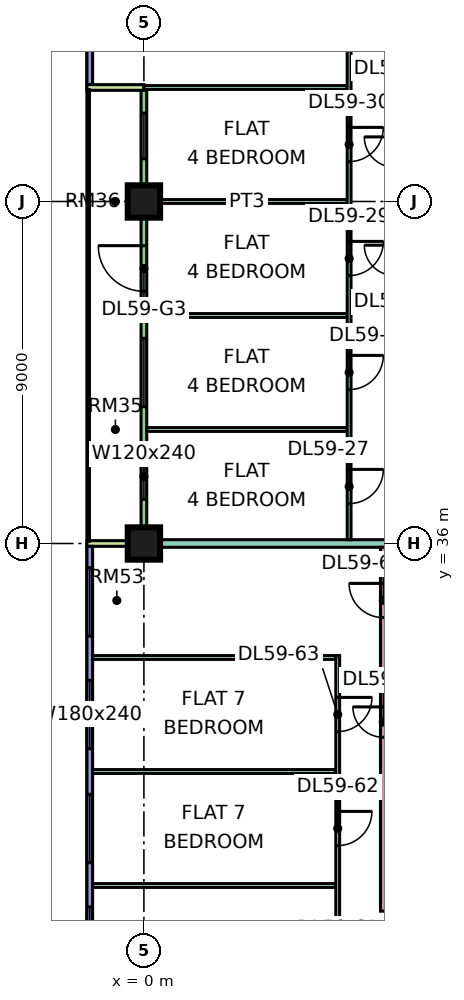
"""IFC4 building model, lengths in metres.
Left out: names, types, materials, properties, quantities, classifications, styles, units other than length and angle.
Written with IfcOpenShell. Run it as: python <this file> out.ifc"""

import sys

from ifc_helpers import new_model, si_unit, direction, frame, frame_2d, origin, origin_2d, place, context, subcontext, project, spatial, rectangle, extrude, element, fill, save


model = new_model("IFC4")
c1 = context("Model", 3, precision=1e-05, world=origin(), true_north=direction((0.0, 1.0)))
c2 = subcontext(c1, "Body", "Model", "MODEL_VIEW")
j1 = project(units=[si_unit("LENGTHUNIT", "METRE"), si_unit("PLANEANGLEUNIT", "RADIAN")], contexts=[c1])
p1 = place(None, origin())
s1 = spatial("IfcSite", under=j1, at=p1, CompositionType="ELEMENT")
p2 = place(p1, origin())
s2 = spatial("IfcBuilding", under=s1, at=p2, CompositionType="ELEMENT")
p3 = place(p2, frame((0.0, 0.0, 249.15)))
s3 = spatial("IfcBuildingStorey", under=s2, at=p3, CompositionType="ELEMENT", Elevation=249.15)
p4 = place(p3, frame((0.0, 36.0, 0.0), z_axis=(0.0, 0.0, 1.0), x_axis=(1.0, 0.0, 0.0)))
e1 = element("IfcColumn", 1, at=p4, inside=s3, PredefinedType="COLUMN", context=c2, shape_type="SweptSolid", body=[
    extrude(rectangle(XDim=0.85, YDim=0.85, at=origin_2d()), origin(), (0.0, 0.0, 1.0), 3.75),
])
p5 = place(p3, frame((0.0, 45.0, 0.0), z_axis=(0.0, 0.0, 1.0), x_axis=(1.0, 0.0, 0.0)))
e2 = element("IfcColumn", 2, at=p5, inside=s3, PredefinedType="COLUMN", context=c2, shape_type="SweptSolid", body=[
    extrude(rectangle(XDim=0.85, YDim=0.85, at=origin_2d()), origin(), (0.0, 0.0, 1.0), 3.75),
])
p6 = place(p3, frame((-1.425, 61.5, 0.0), z_axis=(0.0, 0.0, 1.0), x_axis=(0.0, -1.0, 0.0)))
e3 = element("IfcWall", 3, at=p6, inside=s3, PredefinedType="SOLIDWALL", context=c2, shape_type="SweptSolid", body=[
    extrude(rectangle(XDim=13.425, YDim=0.15, at=frame_2d((6.712, 0.0))), origin(), (0.0, 0.0, 1.0), 3.35),
])
p7 = place(p6, frame((0.3, 0.0, 0.45)))
e4 = element("IfcOpeningElement", 4, at=p7, cuts=e3, PredefinedType="OPENING", context=c2, shape_type="SweptSolid", body=[
    extrude(rectangle(XDim=0.9, YDim=2.4, at=frame_2d((0.45, 1.2))), frame((0.0, 0.085, 0.0), z_axis=(0.0, -1.0, 0.0), x_axis=(1.0, 0.0, 0.0)), (0.0, 0.0, 1.0), 0.17),
])
p8 = place(p6, frame((2.1, 0.0, 0.45)))
e5 = element("IfcOpeningElement", 5, at=p8, cuts=e3, PredefinedType="OPENING", context=c2, shape_type="SweptSolid", body=[
    extrude(rectangle(XDim=1.8, YDim=2.4, at=frame_2d((0.9, 1.2))), frame((0.0, 0.085, 0.0), z_axis=(0.0, -1.0, 0.0), x_axis=(1.0, 0.0, 0.0)), (0.0, 0.0, 1.0), 0.17),
])
p9 = place(p6, frame((7.462, 0.0, 0.45)))
e6 = element("IfcOpeningElement", 6, at=p9, cuts=e3, PredefinedType="OPENING", context=c2, shape_type="SweptSolid", body=[
    extrude(rectangle(XDim=3.0, YDim=2.4, at=frame_2d((1.5, 1.2))), frame((0.0, 0.085, 0.0), z_axis=(0.0, -1.0, 0.0), x_axis=(1.0, 0.0, 0.0)), (0.0, 0.0, 1.0), 0.17),
])
p10 = place(p3, frame((0.0, 47.925, 0.0), z_axis=(0.0, 0.0, 1.0), x_axis=(0.0, -1.0, 0.0)))
e7 = element("IfcWall", 7, at=p10, inside=s3, PredefinedType="SOLIDWALL", context=c2, shape_type="SweptSolid", body=[
    extrude(rectangle(XDim=11.85, YDim=0.15, at=frame_2d((5.925, 0.0))), origin(), (0.0, 0.0, 1.0), 3.35),
])
p11 = place(p10, frame((0.6, 0.0, 0.45)))
e8 = element("IfcOpeningElement", 8, at=p11, cuts=e7, PredefinedType="OPENING", context=c2, shape_type="SweptSolid", body=[
    extrude(rectangle(XDim=1.2, YDim=2.4, at=frame_2d((0.6, 1.2))), frame((0.0, 0.085, 0.0), z_axis=(0.0, -1.0, 0.0), x_axis=(1.0, 0.0, 0.0)), (0.0, 0.0, 1.0), 0.17),
])
p12 = place(p10, frame((4.087, 0.0, 0.0)))
e9 = element("IfcOpeningElement", 9, at=p12, cuts=e7, PredefinedType="OPENING", context=c2, shape_type="SweptSolid", body=[
    extrude(rectangle(XDim=1.2, YDim=2.4, at=frame_2d((0.6, 1.2))), frame((0.0, 0.085, 0.0), z_axis=(0.0, -1.0, 0.0), x_axis=(1.0, 0.0, 0.0)), (0.0, 0.0, 1.0), 0.17),
])
p13 = place(p10, frame((6.525, 0.0, 0.45)))
e10 = element("IfcOpeningElement", 10, at=p13, cuts=e7, PredefinedType="OPENING", context=c2, shape_type="SweptSolid", body=[
    extrude(rectangle(XDim=1.8, YDim=2.4, at=frame_2d((0.9, 1.2))), frame((0.0, 0.085, 0.0), z_axis=(0.0, -1.0, 0.0), x_axis=(1.0, 0.0, 0.0)), (0.0, 0.0, 1.0), 0.17),
])
p14 = place(p10, frame((9.562, 0.0, 0.45)))
e11 = element("IfcOpeningElement", 11, at=p14, cuts=e7, PredefinedType="OPENING", context=c2, shape_type="SweptSolid", body=[
    extrude(rectangle(XDim=1.2, YDim=2.4, at=frame_2d((0.6, 1.2))), frame((0.0, 0.085, 0.0), z_axis=(0.0, -1.0, 0.0), x_axis=(1.0, 0.0, 0.0)), (0.0, 0.0, 1.0), 0.17),
])
for number, where, z_axis, x_axis in (
    (12, (-1.5, 48.0, 0.0), (0.0, 0.0, 1.0), (1.0, 0.0, 0.0)),
    (13, (-1.5, 36.0, 0.0), (0.0, 0.0, 1.0), (1.0, 0.0, 0.0)),
):
    element("IfcWall", number, at=place(p3, frame(where, z_axis=z_axis, x_axis=x_axis)), inside=s3, PredefinedType="SOLIDWALL", context=c2, shape_type="SweptSolid", body=[
        extrude(rectangle(XDim=1.5, YDim=0.15, at=frame_2d((0.75, 0.0))), origin(), (0.0, 0.0, 1.0), 3.35),
    ])
p15 = place(p3, frame((-1.425, 35.925, 0.0), z_axis=(0.0, 0.0, 1.0), x_axis=(0.0, -1.0, 0.0)))
e14 = element("IfcWall", 14, at=p15, inside=s3, PredefinedType="SOLIDWALL", context=c2, shape_type="SweptSolid", body=[
    extrude(rectangle(XDim=11.85, YDim=0.15, at=frame_2d((5.925, 0.0))), origin(), (0.0, 0.0, 1.0), 3.35),
])
p16 = place(p15, frame((0.562, 0.0, 0.45)))
e15 = element("IfcOpeningElement", 15, at=p16, cuts=e14, PredefinedType="OPENING", context=c2, shape_type="SweptSolid", body=[
    extrude(rectangle(XDim=1.8, YDim=2.4, at=frame_2d((0.9, 1.2))), frame((0.0, 0.085, 0.0), z_axis=(0.0, -1.0, 0.0), x_axis=(1.0, 0.0, 0.0)), (0.0, 0.0, 1.0), 0.17),
])
p17 = place(p15, frame((3.525, 0.0, 0.45)))
e16 = element("IfcOpeningElement", 16, at=p17, cuts=e14, PredefinedType="OPENING", context=c2, shape_type="SweptSolid", body=[
    extrude(rectangle(XDim=1.8, YDim=2.4, at=frame_2d((0.9, 1.2))), frame((0.0, 0.085, 0.0), z_axis=(0.0, -1.0, 0.0), x_axis=(1.0, 0.0, 0.0)), (0.0, 0.0, 1.0), 0.17),
])
p18 = place(p15, frame((6.525, 0.0, 0.45)))
e17 = element("IfcOpeningElement", 17, at=p18, cuts=e14, PredefinedType="OPENING", context=c2, shape_type="SweptSolid", body=[
    extrude(rectangle(XDim=1.8, YDim=2.4, at=frame_2d((0.9, 1.2))), frame((0.0, 0.085, 0.0), z_axis=(0.0, -1.0, 0.0), x_axis=(1.0, 0.0, 0.0)), (0.0, 0.0, 1.0), 0.17),
])
p19 = place(p15, frame((9.488, 0.0, 0.45)))
e18 = element("IfcOpeningElement", 18, at=p19, cuts=e14, PredefinedType="OPENING", context=c2, shape_type="SweptSolid", body=[
    extrude(rectangle(XDim=1.8, YDim=2.4, at=frame_2d((0.9, 1.2))), frame((0.0, 0.085, 0.0), z_axis=(0.0, -1.0, 0.0), x_axis=(1.0, 0.0, 0.0)), (0.0, 0.0, 1.0), 0.17),
])
for number, where, z_axis, x_axis in (
    (19, (-1.351, 27.0, 0.0), (0.0, 0.0, 1.0), (1.0, 0.0, 0.0)),
    (20, (-1.351, 30.0, 0.0), (0.0, 0.0, 1.0), (1.0, 0.0, 0.0)),
):
    element("IfcWall", number, at=place(p3, frame(where, z_axis=z_axis, x_axis=x_axis)), inside=s3, PredefinedType="PARTITIONING", context=c2, shape_type="SweptSolid", body=[
        extrude(rectangle(XDim=6.401, YDim=0.1, at=frame_2d((3.201, 0.0))), origin(), (0.0, 0.0, 1.0), 3.35),
    ])
p20 = place(p3, frame((-1.35, 33.0, 0.0), z_axis=(0.0, 0.0, 1.0), x_axis=(1.0, 0.0, 0.0)))
e21 = element("IfcWall", 21, at=p20, inside=s3, PredefinedType="PARTITIONING", context=c2, shape_type="SweptSolid", body=[
    extrude(rectangle(XDim=6.4, YDim=0.1, at=frame_2d((3.2, 0.0))), origin(), (0.0, 0.0, 1.0), 3.35),
])
e22 = element("IfcWall", 22, at=p4, inside=s3, PredefinedType="PARTITIONING", context=c2, shape_type="SweptSolid", body=[
    extrude(rectangle(XDim=6.375, YDim=0.2, at=frame_2d((3.188, 0.0))), origin(), (0.0, 0.0, 1.0), 3.35),
])
p21 = place(p3, frame((0.0, 48.0, 0.0), z_axis=(0.0, 0.0, 1.0), x_axis=(1.0, 0.0, 0.0)))
e23 = element("IfcWall", 23, at=p21, inside=s3, PredefinedType="PARTITIONING", context=c2, shape_type="SweptSolid", body=[
    extrude(rectangle(XDim=5.35, YDim=0.1, at=frame_2d((2.675, 0.0))), origin(), (0.0, 0.0, 1.0), 3.35),
])
for number, where, z_axis, x_axis in (
    (24, (0.074, 39.0, 0.0), (0.0, 0.0, 1.0), (1.0, 0.0, 0.0)),
    (25, (0.074, 42.0, 0.0), (0.0, 0.0, 1.0), (1.0, 0.0, 0.0)),
    (26, (0.074, 45.0, 0.0), (0.0, 0.0, 1.0), (1.0, 0.0, 0.0)),
):
    element("IfcWall", number, at=place(p3, frame(where, z_axis=z_axis, x_axis=x_axis)), inside=s3, PredefinedType="PARTITIONING", context=c2, shape_type="SweptSolid", body=[
        extrude(rectangle(XDim=5.276, YDim=0.1, at=frame_2d((2.638, 0.0))), origin(), (0.0, 0.0, 1.0), 3.35),
    ])
p22 = place(p3, frame((5.1, 22.5, 0.0), z_axis=(0.0, 0.0, 1.0), x_axis=(0.0, 1.0, 0.0)))
e27 = element("IfcWall", 27, at=p22, inside=s3, PredefinedType="PARTITIONING", context=c2, shape_type="SweptSolid", body=[
    extrude(rectangle(XDim=10.55, YDim=0.1, at=frame_2d((5.275, 0.0))), origin(), (0.0, 0.0, 1.0), 3.35),
])
p23 = place(p22, frame((1.8, 0.0, 0.0)))
e28 = element("IfcOpeningElement", 28, at=p23, cuts=e27, PredefinedType="OPENING", context=c2, shape_type="SweptSolid", body=[
    extrude(rectangle(XDim=0.9, YDim=2.1, at=frame_2d((0.45, 1.05))), frame((0.0, 0.06, 0.0), z_axis=(0.0, -1.0, 0.0), x_axis=(1.0, 0.0, 0.0)), (0.0, 0.0, 1.0), 0.12),
])
p24 = place(p22, frame((5.55, 0.0, 0.0)))
e29 = element("IfcOpeningElement", 29, at=p24, cuts=e27, PredefinedType="OPENING", context=c2, shape_type="SweptSolid", body=[
    extrude(rectangle(XDim=0.9, YDim=2.1, at=frame_2d((0.45, 1.05))), frame((0.0, 0.06, 0.0), z_axis=(0.0, -1.0, 0.0), x_axis=(1.0, 0.0, 0.0)), (0.0, 0.0, 1.0), 0.12),
])
p25 = place(p22, frame((8.55, 0.0, 0.0)))
e30 = element("IfcOpeningElement", 30, at=p25, cuts=e27, PredefinedType="OPENING", context=c2, shape_type="SweptSolid", body=[
    extrude(rectangle(XDim=0.9, YDim=2.1, at=frame_2d((0.45, 1.05))), frame((0.0, 0.06, 0.0), z_axis=(0.0, -1.0, 0.0), x_axis=(1.0, 0.0, 0.0)), (0.0, 0.0, 1.0), 0.12),
])
p26 = place(p3, frame((5.4, 36.1, 0.0), z_axis=(0.0, 0.0, 1.0), x_axis=(0.0, 1.0, 0.0)))
e31 = element("IfcWall", 31, at=p26, inside=s3, PredefinedType="PARTITIONING", context=c2, shape_type="SweptSolid", body=[
    extrude(rectangle(XDim=26.95, YDim=0.1, at=frame_2d((13.475, 0.0))), origin(), (0.0, 0.0, 1.0), 3.35),
])
p27 = place(p26, frame((0.95, 0.0, 0.0)))
e32 = element("IfcOpeningElement", 32, at=p27, cuts=e31, PredefinedType="OPENING", context=c2, shape_type="SweptSolid", body=[
    extrude(rectangle(XDim=0.9, YDim=2.1, at=frame_2d((0.45, 1.05))), frame((0.0, 0.06, 0.0), z_axis=(0.0, -1.0, 0.0), x_axis=(1.0, 0.0, 0.0)), (0.0, 0.0, 1.0), 0.12),
])
p28 = place(p26, frame((3.95, 0.0, 0.0)))
e33 = element("IfcOpeningElement", 33, at=p28, cuts=e31, PredefinedType="OPENING", context=c2, shape_type="SweptSolid", body=[
    extrude(rectangle(XDim=0.9, YDim=2.1, at=frame_2d((0.45, 1.05))), frame((0.0, 0.06, 0.0), z_axis=(0.0, -1.0, 0.0), x_axis=(1.0, 0.0, 0.0)), (0.0, 0.0, 1.0), 0.12),
])
p29 = place(p26, frame((6.95, 0.0, 0.0)))
e34 = element("IfcOpeningElement", 34, at=p29, cuts=e31, PredefinedType="OPENING", context=c2, shape_type="SweptSolid", body=[
    extrude(rectangle(XDim=0.9, YDim=2.1, at=frame_2d((0.45, 1.05))), frame((0.0, 0.06, 0.0), z_axis=(0.0, -1.0, 0.0), x_axis=(1.0, 0.0, 0.0)), (0.0, 0.0, 1.0), 0.12),
])
p30 = place(p26, frame((9.95, 0.0, 0.0)))
e35 = element("IfcOpeningElement", 35, at=p30, cuts=e31, PredefinedType="OPENING", context=c2, shape_type="SweptSolid", body=[
    extrude(rectangle(XDim=0.9, YDim=2.1, at=frame_2d((0.45, 1.05))), frame((0.0, 0.06, 0.0), z_axis=(0.0, -1.0, 0.0), x_axis=(1.0, 0.0, 0.0)), (0.0, 0.0, 1.0), 0.12),
])
p31 = place(p26, frame((21.95, 0.0, 0.0)))
e36 = element("IfcOpeningElement", 36, at=p31, cuts=e31, PredefinedType="OPENING", context=c2, shape_type="SweptSolid", body=[
    extrude(rectangle(XDim=0.9, YDim=2.1, at=frame_2d((0.45, 1.05))), frame((0.0, 0.06, 0.0), z_axis=(0.0, -1.0, 0.0), x_axis=(1.0, 0.0, 0.0)), (0.0, 0.0, 1.0), 0.12),
])
p32 = place(p26, frame((24.95, 0.0, 0.0)))
e37 = element("IfcOpeningElement", 37, at=p32, cuts=e31, PredefinedType="OPENING", context=c2, shape_type="SweptSolid", body=[
    extrude(rectangle(XDim=0.9, YDim=2.1, at=frame_2d((0.45, 1.05))), frame((0.0, 0.06, 0.0), z_axis=(0.0, -1.0, 0.0), x_axis=(1.0, 0.0, 0.0)), (0.0, 0.0, 1.0), 0.12),
])
p33 = place(p26, frame((15.95, 0.0, 0.0)))
e38 = element("IfcOpeningElement", 38, at=p33, cuts=e31, PredefinedType="OPENING", context=c2, shape_type="SweptSolid", body=[
    extrude(rectangle(XDim=0.9, YDim=2.1, at=frame_2d((0.45, 1.05))), frame((0.0, 0.06, 0.0), z_axis=(0.0, -1.0, 0.0), x_axis=(1.0, 0.0, 0.0)), (0.0, 0.0, 1.0), 0.12),
])
p34 = place(p3, frame((6.3, 26.325, 0.0), z_axis=(0.0, 0.0, 1.0), x_axis=(0.0, 1.0, 0.0)))
e39 = element("IfcWall", 39, at=p34, inside=s3, PredefinedType="PARTITIONING", context=c2, shape_type="SweptSolid", body=[
    extrude(rectangle(XDim=9.575, YDim=0.15, at=frame_2d((4.788, 0.0))), origin(), (0.0, 0.0, 1.0), 3.35),
])
p35 = place(p34, frame((4.575, 0.0, 0.0)))
e40 = element("IfcOpeningElement", 40, at=p35, cuts=e39, PredefinedType="OPENING", context=c2, shape_type="SweptSolid", body=[
    extrude(rectangle(XDim=0.8, YDim=2.1, at=frame_2d((0.4, 1.05))), frame((0.0, 0.085, 0.0), z_axis=(0.0, -1.0, 0.0), x_axis=(1.0, 0.0, 0.0)), (0.0, 0.0, 1.0), 0.17),
])
p36 = place(p34, frame((7.725, 0.0, 0.0)))
e41 = element("IfcOpeningElement", 41, at=p36, cuts=e39, PredefinedType="OPENING", context=c2, shape_type="SweptSolid", body=[
    extrude(rectangle(XDim=0.9, YDim=2.1, at=frame_2d((0.45, 1.05))), frame((0.0, 0.085, 0.0), z_axis=(0.0, -1.0, 0.0), x_axis=(1.0, 0.0, 0.0)), (0.0, 0.0, 1.0), 0.17),
])
p37 = place(p11, origin())
e42 = element("IfcWindow", 42, at=p37, inside=s3, PartitioningType="SINGLE_PANEL", PredefinedType="WINDOW", context=c2, shape_type="SweptSolid", body=[
    extrude(rectangle(XDim=1.2, YDim=2.4, at=frame_2d((0.6, 1.2))), frame((0.0, 0.03, 0.0), z_axis=(0.0, -1.0, 0.0), x_axis=(1.0, 0.0, 0.0)), (0.0, 0.0, 1.0), 0.06),
])
fill(e8, e42)
p38 = place(p12, frame((1.2, 0.0, 0.0), z_axis=(0.0, 0.0, 1.0), x_axis=(-1.0, 0.0, 0.0)))
e43 = element("IfcDoor", 43, at=p38, inside=s3, OperationType="DOUBLE_DOOR_SINGLE_SWING", PredefinedType="DOOR", context=c2, shape_type="SweptSolid", body=[
    extrude(rectangle(XDim=1.2, YDim=2.4, at=frame_2d((0.6, 1.2))), frame((0.0, 0.025, 0.0), z_axis=(0.0, -1.0, 0.0), x_axis=(1.0, 0.0, 0.0)), (0.0, 0.0, 1.0), 0.05),
])
fill(e9, e43)
p39 = place(p13, origin())
e44 = element("IfcWindow", 44, at=p39, inside=s3, PartitioningType="SINGLE_PANEL", PredefinedType="WINDOW", context=c2, shape_type="SweptSolid", body=[
    extrude(rectangle(XDim=1.8, YDim=2.4, at=frame_2d((0.9, 1.2))), frame((0.0, 0.03, 0.0), z_axis=(0.0, -1.0, 0.0), x_axis=(1.0, 0.0, 0.0)), (0.0, 0.0, 1.0), 0.06),
])
fill(e10, e44)
p40 = place(p14, origin())
e45 = element("IfcWindow", 45, at=p40, inside=s3, PartitioningType="SINGLE_PANEL", PredefinedType="WINDOW", context=c2, shape_type="SweptSolid", body=[
    extrude(rectangle(XDim=1.2, YDim=2.4, at=frame_2d((0.6, 1.2))), frame((0.0, 0.03, 0.0), z_axis=(0.0, -1.0, 0.0), x_axis=(1.0, 0.0, 0.0)), (0.0, 0.0, 1.0), 0.06),
])
fill(e11, e45)
p41 = place(p16, origin())
e46 = element("IfcWindow", 46, at=p41, inside=s3, PartitioningType="SINGLE_PANEL", PredefinedType="WINDOW", context=c2, shape_type="SweptSolid", body=[
    extrude(rectangle(XDim=1.8, YDim=2.4, at=frame_2d((0.9, 1.2))), frame((0.0, 0.03, 0.0), z_axis=(0.0, -1.0, 0.0), x_axis=(1.0, 0.0, 0.0)), (0.0, 0.0, 1.0), 0.06),
])
fill(e15, e46)
p42 = place(p17, origin())
e47 = element("IfcWindow", 47, at=p42, inside=s3, PartitioningType="SINGLE_PANEL", PredefinedType="WINDOW", context=c2, shape_type="SweptSolid", body=[
    extrude(rectangle(XDim=1.8, YDim=2.4, at=frame_2d((0.9, 1.2))), frame((0.0, 0.03, 0.0), z_axis=(0.0, -1.0, 0.0), x_axis=(1.0, 0.0, 0.0)), (0.0, 0.0, 1.0), 0.06),
])
fill(e16, e47)
p43 = place(p18, origin())
e48 = element("IfcWindow", 48, at=p43, inside=s3, PartitioningType="SINGLE_PANEL", PredefinedType="WINDOW", context=c2, shape_type="SweptSolid", body=[
    extrude(rectangle(XDim=1.8, YDim=2.4, at=frame_2d((0.9, 1.2))), frame((0.0, 0.03, 0.0), z_axis=(0.0, -1.0, 0.0), x_axis=(1.0, 0.0, 0.0)), (0.0, 0.0, 1.0), 0.06),
])
fill(e17, e48)
p44 = place(p19, origin())
e49 = element("IfcWindow", 49, at=p44, inside=s3, PartitioningType="SINGLE_PANEL", PredefinedType="WINDOW", context=c2, shape_type="SweptSolid", body=[
    extrude(rectangle(XDim=1.8, YDim=2.4, at=frame_2d((0.9, 1.2))), frame((0.0, 0.03, 0.0), z_axis=(0.0, -1.0, 0.0), x_axis=(1.0, 0.0, 0.0)), (0.0, 0.0, 1.0), 0.06),
])
fill(e18, e49)
p45 = place(p27, origin())
e50 = element("IfcDoor", 50, at=p45, inside=s3, OperationType="SINGLE_SWING_RIGHT", PredefinedType="DOOR", context=c2, shape_type="SweptSolid", body=[
    extrude(rectangle(XDim=0.9, YDim=2.1, at=frame_2d((0.45, 1.05))), frame((0.0, 0.025, 0.0), z_axis=(0.0, -1.0, 0.0), x_axis=(1.0, 0.0, 0.0)), (0.0, 0.0, 1.0), 0.05),
])
fill(e32, e50)
p46 = place(p28, origin())
e51 = element("IfcDoor", 51, at=p46, inside=s3, OperationType="SINGLE_SWING_RIGHT", PredefinedType="DOOR", context=c2, shape_type="SweptSolid", body=[
    extrude(rectangle(XDim=0.9, YDim=2.1, at=frame_2d((0.45, 1.05))), frame((0.0, 0.025, 0.0), z_axis=(0.0, -1.0, 0.0), x_axis=(1.0, 0.0, 0.0)), (0.0, 0.0, 1.0), 0.05),
])
fill(e33, e51)
p47 = place(p29, origin())
e52 = element("IfcDoor", 52, at=p47, inside=s3, OperationType="SINGLE_SWING_RIGHT", PredefinedType="DOOR", context=c2, shape_type="SweptSolid", body=[
    extrude(rectangle(XDim=0.9, YDim=2.1, at=frame_2d((0.45, 1.05))), frame((0.0, 0.025, 0.0), z_axis=(0.0, -1.0, 0.0), x_axis=(1.0, 0.0, 0.0)), (0.0, 0.0, 1.0), 0.05),
])
fill(e34, e52)
p48 = place(p30, origin())
e53 = element("IfcDoor", 53, at=p48, inside=s3, OperationType="SINGLE_SWING_RIGHT", PredefinedType="DOOR", context=c2, shape_type="SweptSolid", body=[
    extrude(rectangle(XDim=0.9, YDim=2.1, at=frame_2d((0.45, 1.05))), frame((0.0, 0.025, 0.0), z_axis=(0.0, -1.0, 0.0), x_axis=(1.0, 0.0, 0.0)), (0.0, 0.0, 1.0), 0.05),
])
fill(e35, e53)
p49 = place(p35, frame((0.8, 0.0, 0.0), z_axis=(0.0, 0.0, 1.0), x_axis=(-1.0, 0.0, 0.0)))
e54 = element("IfcDoor", 54, at=p49, inside=s3, OperationType="SINGLE_SWING_RIGHT", PredefinedType="DOOR", context=c2, shape_type="SweptSolid", body=[
    extrude(rectangle(XDim=0.8, YDim=2.1, at=frame_2d((0.4, 1.05))), frame((0.0, 0.025, 0.0), z_axis=(0.0, -1.0, 0.0), x_axis=(1.0, 0.0, 0.0)), (0.0, 0.0, 1.0), 0.05),
])
fill(e40, e54)
p50 = place(p24, origin())
e55 = element("IfcDoor", 55, at=p50, inside=s3, OperationType="SINGLE_SWING_RIGHT", PredefinedType="DOOR", context=c2, shape_type="SweptSolid", body=[
    extrude(rectangle(XDim=0.9, YDim=2.1, at=frame_2d((0.45, 1.05))), frame((0.0, 0.025, 0.0), z_axis=(0.0, -1.0, 0.0), x_axis=(1.0, 0.0, 0.0)), (0.0, 0.0, 1.0), 0.05),
])
fill(e29, e55)
p51 = place(p25, origin())
e56 = element("IfcDoor", 56, at=p51, inside=s3, OperationType="SINGLE_SWING_RIGHT", PredefinedType="DOOR", context=c2, shape_type="SweptSolid", body=[
    extrude(rectangle(XDim=0.9, YDim=2.1, at=frame_2d((0.45, 1.05))), frame((0.0, 0.025, 0.0), z_axis=(0.0, -1.0, 0.0), x_axis=(1.0, 0.0, 0.0)), (0.0, 0.0, 1.0), 0.05),
])
fill(e30, e56)
p52 = place(p36, frame((0.9, 0.0, 0.0), z_axis=(0.0, 0.0, 1.0), x_axis=(-1.0, 0.0, 0.0)))
e57 = element("IfcDoor", 57, at=p52, inside=s3, OperationType="SINGLE_SWING_RIGHT", PredefinedType="DOOR", context=c2, shape_type="SweptSolid", body=[
    extrude(rectangle(XDim=0.9, YDim=2.1, at=frame_2d((0.45, 1.05))), frame((0.0, 0.025, 0.0), z_axis=(0.0, -1.0, 0.0), x_axis=(1.0, 0.0, 0.0)), (0.0, 0.0, 1.0), 0.05),
])
fill(e41, e57)
save(model, sys.argv[1])
